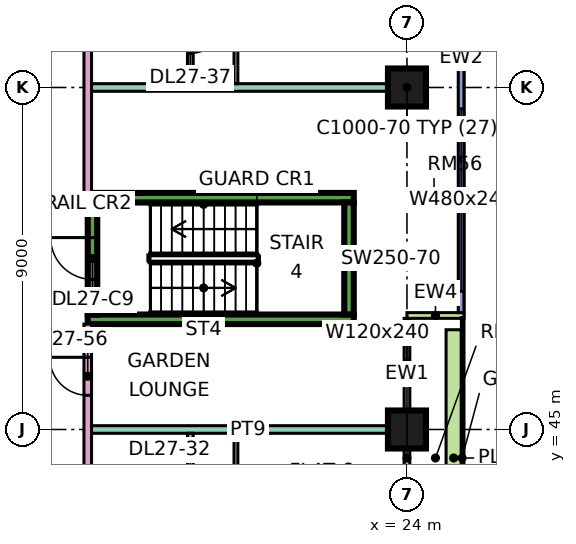
"""IFC4 building model, lengths in metres.
Left out: names, types, materials, properties, quantities, classifications, styles, units other than length and angle.
Written with IfcOpenShell. Run it as: python <this file> out.ifc"""

import sys

from ifc_helpers import new_model, si_unit, direction, frame, frame_2d, origin, origin_2d, place, context, subcontext, project, spatial, rectangle, extrude, element, fill, save


model = new_model("IFC4")
c1 = context("Model", 3, precision=1e-05, world=origin(), true_north=direction((0.0, 1.0)))
c2 = subcontext(c1, "Body", "Model", "MODEL_VIEW")
j1 = project(units=[si_unit("LENGTHUNIT", "METRE"), si_unit("PLANEANGLEUNIT", "RADIAN")], contexts=[c1])
p1 = place(None, origin())
s1 = spatial("IfcSite", under=j1, at=p1, CompositionType="ELEMENT")
p2 = place(p1, origin())
s2 = spatial("IfcBuilding", under=s1, at=p2, CompositionType="ELEMENT")
p3 = place(p2, frame((0.0, 0.0, 118.15)))
s3 = spatial("IfcBuildingStorey", under=s2, at=p3, CompositionType="ELEMENT", Elevation=118.15)
for number, where, z_axis, x_axis in (
    (1, (24.0, 45.0, 0.0), (0.0, 0.0, 1.0), (1.0, 0.0, 0.0)),
    (2, (24.0, 54.0, 0.0), (0.0, 0.0, 1.0), (1.0, 0.0, 0.0)),
):
    element("IfcColumn", number, at=place(p3, frame(where, z_axis=z_axis, x_axis=x_axis)), inside=s3, PredefinedType="COLUMN", context=c2, shape_type="SweptSolid", body=[
        extrude(rectangle(XDim=1.0, YDim=1.0, at=origin_2d()), origin(), (0.0, 0.0, 1.0), 3.75),
    ])
for number, where, z_axis, x_axis in (
    (3, (15.6, 47.9, 0.0), (0.0, 0.0, 1.0), (1.0, 0.0, 0.0)),
    (4, (15.6, 51.1, 0.0), (0.0, 0.0, 1.0), (1.0, 0.0, 0.0)),
):
    element("IfcWall", number, at=place(p3, frame(where, z_axis=z_axis, x_axis=x_axis)), inside=s3, PredefinedType="SHEAR", context=c2, shape_type="SweptSolid", body=[
        extrude(rectangle(XDim=7.0, YDim=0.25, at=frame_2d((3.5, 0.0))), origin(), (0.0, 0.0, 1.0), 3.75),
    ])
p4 = place(p3, frame((15.725, 48.025, 0.0), z_axis=(0.0, 0.0, 1.0), x_axis=(0.0, 1.0, 0.0)))
e5 = element("IfcWall", 5, at=p4, inside=s3, PredefinedType="SHEAR", context=c2, shape_type="SweptSolid", body=[
    extrude(rectangle(XDim=2.95, YDim=0.25, at=frame_2d((1.475, 0.0))), origin(), (0.0, 0.0, 1.0), 3.75),
])
p5 = place(p4, frame((0.925, 0.0, 0.0)))
e6 = element("IfcOpeningElement", 6, at=p5, cuts=e5, PredefinedType="OPENING", context=c2, shape_type="SweptSolid", body=[
    extrude(rectangle(XDim=1.1, YDim=2.2, at=frame_2d((0.55, 1.1))), frame((0.0, 0.135, 0.0), z_axis=(0.0, -1.0, 0.0), x_axis=(1.0, 0.0, 0.0)), (0.0, 0.0, 1.0), 0.27),
])
p6 = place(p3, frame((22.475, 48.025, 0.0), z_axis=(0.0, 0.0, 1.0), x_axis=(0.0, 1.0, 0.0)))
e7 = element("IfcWall", 7, at=p6, inside=s3, PredefinedType="SHEAR", context=c2, shape_type="SweptSolid", body=[
    extrude(rectangle(XDim=2.95, YDim=0.25, at=frame_2d((1.475, 0.0))), origin(), (0.0, 0.0, 1.0), 3.75),
])
p7 = place(p3, frame((24.0, 40.575, 0.0), z_axis=(0.0, 0.0, 1.0), x_axis=(0.0, 1.0, 0.0)))
e8 = element("IfcWall", 8, at=p7, inside=s3, PredefinedType="SOLIDWALL", context=c2, shape_type="SweptSolid", body=[
    extrude(rectangle(XDim=7.35, YDim=0.15, at=frame_2d((3.675, 0.0))), origin(), (0.0, 0.0, 1.0), 3.35),
])
p8 = place(p7, frame((0.262, 0.0, 0.45)))
e9 = element("IfcOpeningElement", 9, at=p8, cuts=e8, PredefinedType="OPENING", context=c2, shape_type="SweptSolid", body=[
    extrude(rectangle(XDim=0.9, YDim=2.4, at=frame_2d((0.45, 1.2))), frame((0.0, 0.085, 0.0), z_axis=(0.0, -1.0, 0.0), x_axis=(1.0, 0.0, 0.0)), (0.0, 0.0, 1.0), 0.17),
])
p9 = place(p7, frame((2.025, 0.0, 0.0)))
e10 = element("IfcOpeningElement", 10, at=p9, cuts=e8, PredefinedType="OPENING", context=c2, shape_type="SweptSolid", body=[
    extrude(rectangle(XDim=1.2, YDim=2.4, at=frame_2d((0.6, 1.2))), frame((0.0, 0.085, 0.0), z_axis=(0.0, -1.0, 0.0), x_axis=(1.0, 0.0, 0.0)), (0.0, 0.0, 1.0), 0.17),
])
p10 = place(p7, frame((5.587, 0.0, 0.45)))
e11 = element("IfcOpeningElement", 11, at=p10, cuts=e8, PredefinedType="OPENING", context=c2, shape_type="SweptSolid", body=[
    extrude(rectangle(XDim=1.2, YDim=2.4, at=frame_2d((0.6, 1.2))), frame((0.0, 0.085, 0.0), z_axis=(0.0, -1.0, 0.0), x_axis=(1.0, 0.0, 0.0)), (0.0, 0.0, 1.0), 0.17),
])
p11 = place(p3, frame((25.5, 48.0, 0.0), z_axis=(0.0, 0.0, 1.0), x_axis=(-1.0, 0.0, 0.0)))
e12 = element("IfcWall", 12, at=p11, inside=s3, PredefinedType="SOLIDWALL", context=c2, shape_type="SweptSolid", body=[
    extrude(rectangle(XDim=1.5, YDim=0.15, at=frame_2d((0.75, 0.0))), origin(), (0.0, 0.0, 1.0), 3.35),
])
p12 = place(p3, frame((25.425, 48.075, 0.0), z_axis=(0.0, 0.0, 1.0), x_axis=(0.0, 1.0, 0.0)))
e13 = element("IfcWall", 13, at=p12, inside=s3, PredefinedType="SOLIDWALL", context=c2, shape_type="SweptSolid", body=[
    extrude(rectangle(XDim=13.425, YDim=0.15, at=frame_2d((6.712, 0.0))), origin(), (0.0, 0.0, 1.0), 3.35),
])
p13 = place(p12, frame((0.562, 0.0, 0.45)))
e14 = element("IfcOpeningElement", 14, at=p13, cuts=e13, PredefinedType="OPENING", context=c2, shape_type="SweptSolid", body=[
    extrude(rectangle(XDim=4.8, YDim=2.4, at=frame_2d((2.4, 1.2))), frame((0.0, 0.085, 0.0), z_axis=(0.0, -1.0, 0.0), x_axis=(1.0, 0.0, 0.0)), (0.0, 0.0, 1.0), 0.17),
])
p14 = place(p12, frame((6.525, 0.0, 0.45)))
e15 = element("IfcOpeningElement", 15, at=p14, cuts=e13, PredefinedType="OPENING", context=c2, shape_type="SweptSolid", body=[
    extrude(rectangle(XDim=1.8, YDim=2.4, at=frame_2d((0.9, 1.2))), frame((0.0, 0.085, 0.0), z_axis=(0.0, -1.0, 0.0), x_axis=(1.0, 0.0, 0.0)), (0.0, 0.0, 1.0), 0.17),
])
p15 = place(p12, frame((9.525, 0.0, 0.45)))
e16 = element("IfcOpeningElement", 16, at=p15, cuts=e13, PredefinedType="OPENING", context=c2, shape_type="SweptSolid", body=[
    extrude(rectangle(XDim=1.8, YDim=2.4, at=frame_2d((0.9, 1.2))), frame((0.0, 0.085, 0.0), z_axis=(0.0, -1.0, 0.0), x_axis=(1.0, 0.0, 0.0)), (0.0, 0.0, 1.0), 0.17),
])
p16 = place(p12, frame((12.225, 0.0, 0.45)))
e17 = element("IfcOpeningElement", 17, at=p16, cuts=e13, PredefinedType="OPENING", context=c2, shape_type="SweptSolid", body=[
    extrude(rectangle(XDim=0.9, YDim=2.4, at=frame_2d((0.45, 1.2))), frame((0.0, 0.085, 0.0), z_axis=(0.0, -1.0, 0.0), x_axis=(1.0, 0.0, 0.0)), (0.0, 0.0, 1.0), 0.17),
])
p17 = place(p3, frame((25.229, 40.875, 0.0), z_axis=(0.0, 0.0, 1.0), x_axis=(0.0, 1.0, 0.0)))
e18 = element("IfcWall", 18, at=p17, inside=s3, PredefinedType="SOLIDWALL", context=c2, shape_type="SweptSolid", body=[
    extrude(rectangle(XDim=6.75, YDim=0.4, at=frame_2d((3.375, 0.0))), origin(), (0.0, 0.0, 1.0), 0.7),
])
p18 = place(p3, frame((15.6, 20.0, 0.0), z_axis=(0.0, 0.0, 1.0), x_axis=(0.0, 1.0, 0.0)))
e19 = element("IfcWall", 19, at=p18, inside=s3, PredefinedType="PARTITIONING", context=c2, shape_type="SweptSolid", body=[
    extrude(rectangle(XDim=27.775, YDim=0.2, at=frame_2d((13.887, 0.0))), origin(), (0.0, 0.0, 1.0), 3.35),
])
p19 = place(p18, frame((7.15, 0.0, 0.0)))
e20 = element("IfcOpeningElement", 20, at=p19, cuts=e19, PredefinedType="OPENING", context=c2, shape_type="SweptSolid", body=[
    extrude(rectangle(XDim=1.6, YDim=2.1, at=frame_2d((0.8, 1.05))), frame((0.0, 0.11, 0.0), z_axis=(0.0, -1.0, 0.0), x_axis=(1.0, 0.0, 0.0)), (0.0, 0.0, 1.0), 0.22),
])
p20 = place(p18, frame((13.5, 0.0, 0.0)))
e21 = element("IfcOpeningElement", 21, at=p20, cuts=e19, PredefinedType="OPENING", context=c2, shape_type="SweptSolid", body=[
    extrude(rectangle(XDim=1.0, YDim=2.1, at=frame_2d((0.5, 1.05))), frame((0.0, 0.11, 0.0), z_axis=(0.0, -1.0, 0.0), x_axis=(1.0, 0.0, 0.0)), (0.0, 0.0, 1.0), 0.22),
])
p21 = place(p18, frame((17.2, 0.0, 0.0)))
e22 = element("IfcOpeningElement", 22, at=p21, cuts=e19, PredefinedType="OPENING", context=c2, shape_type="SweptSolid", body=[
    extrude(rectangle(XDim=1.0, YDim=2.1, at=frame_2d((0.5, 1.05))), frame((0.0, 0.11, 0.0), z_axis=(0.0, -1.0, 0.0), x_axis=(1.0, 0.0, 0.0)), (0.0, 0.0, 1.0), 0.22),
])
p22 = place(p18, frame((1.15, 0.0, 0.0)))
e23 = element("IfcOpeningElement", 23, at=p22, cuts=e19, PredefinedType="OPENING", context=c2, shape_type="SweptSolid", body=[
    extrude(rectangle(XDim=1.8, YDim=2.1, at=frame_2d((0.9, 1.05))), frame((0.0, 0.11, 0.0), z_axis=(0.0, -1.0, 0.0), x_axis=(1.0, 0.0, 0.0)), (0.0, 0.0, 1.0), 0.22),
])
p23 = place(p18, frame((25.9, 0.0, 0.0)))
e24 = element("IfcOpeningElement", 24, at=p23, cuts=e19, PredefinedType="OPENING", context=c2, shape_type="SweptSolid", body=[
    extrude(rectangle(XDim=1.0, YDim=2.1, at=frame_2d((0.5, 1.05))), frame((0.0, 0.11, 0.0), z_axis=(0.0, -1.0, 0.0), x_axis=(1.0, 0.0, 0.0)), (0.0, 0.0, 1.0), 0.22),
])
p24 = place(p3, frame((15.6, 51.225, 0.0), z_axis=(0.0, 0.0, 1.0), x_axis=(0.0, 1.0, 0.0)))
e25 = element("IfcWall", 25, at=p24, inside=s3, PredefinedType="PARTITIONING", context=c2, shape_type="SweptSolid", body=[
    extrude(rectangle(XDim=11.701, YDim=0.2, at=frame_2d((5.851, 0.0))), origin(), (0.0, 0.0, 1.0), 3.35),
])
p25 = place(p24, frame((9.975, 0.0, 0.0)))
e26 = element("IfcOpeningElement", 26, at=p25, cuts=e25, PredefinedType="OPENING", context=c2, shape_type="SweptSolid", body=[
    extrude(rectangle(XDim=1.0, YDim=2.1, at=frame_2d((0.5, 1.05))), frame((0.0, 0.11, 0.0), z_axis=(0.0, -1.0, 0.0), x_axis=(1.0, 0.0, 0.0)), (0.0, 0.0, 1.0), 0.22),
])
p26 = place(p3, frame((15.7, 45.0, 0.0), z_axis=(0.0, 0.0, 1.0), x_axis=(1.0, 0.0, 0.0)))
e27 = element("IfcWall", 27, at=p26, inside=s3, PredefinedType="PARTITIONING", context=c2, shape_type="SweptSolid", body=[
    extrude(rectangle(XDim=8.226, YDim=0.2, at=frame_2d((4.113, 0.0))), origin(), (0.0, 0.0, 1.0), 3.35),
])
p27 = place(p3, frame((15.7, 54.0, 0.0), z_axis=(0.0, 0.0, 1.0), x_axis=(1.0, 0.0, 0.0)))
e28 = element("IfcWall", 28, at=p27, inside=s3, PredefinedType="PARTITIONING", context=c2, shape_type="SweptSolid", body=[
    extrude(rectangle(XDim=8.3, YDim=0.2, at=frame_2d((4.15, 0.0))), origin(), (0.0, 0.0, 1.0), 3.35),
])
p28 = place(p3, frame((18.3, 39.225, 0.0), z_axis=(0.0, 0.0, 1.0), x_axis=(0.0, 1.0, 0.0)))
e29 = element("IfcWall", 29, at=p28, inside=s3, PredefinedType="PARTITIONING", context=c2, shape_type="SweptSolid", body=[
    extrude(rectangle(XDim=5.675, YDim=0.15, at=frame_2d((2.837, 0.0))), origin(), (0.0, 0.0, 1.0), 3.35),
])
p29 = place(p28, frame((3.825, 0.0, 0.0)))
e30 = element("IfcOpeningElement", 30, at=p29, cuts=e29, PredefinedType="OPENING", context=c2, shape_type="SweptSolid", body=[
    extrude(rectangle(XDim=0.9, YDim=2.1, at=frame_2d((0.45, 1.05))), frame((0.0, 0.085, 0.0), z_axis=(0.0, -1.0, 0.0), x_axis=(1.0, 0.0, 0.0)), (0.0, 0.0, 1.0), 0.17),
])
p30 = place(p3, frame((18.3, 54.1, 0.0), z_axis=(0.0, 0.0, 1.0), x_axis=(0.0, 1.0, 0.0)))
e31 = element("IfcWall", 31, at=p30, inside=s3, PredefinedType="PARTITIONING", context=c2, shape_type="SweptSolid", body=[
    extrude(rectangle(XDim=6.275, YDim=0.15, at=frame_2d((3.137, 0.0))), origin(), (0.0, 0.0, 1.0), 3.35),
])
p31 = place(p30, frame((4.05, 0.0, 0.0)))
e32 = element("IfcOpeningElement", 32, at=p31, cuts=e31, PredefinedType="OPENING", context=c2, shape_type="SweptSolid", body=[
    extrude(rectangle(XDim=0.8, YDim=2.1, at=frame_2d((0.4, 1.05))), frame((0.0, 0.085, 0.0), z_axis=(0.0, -1.0, 0.0), x_axis=(1.0, 0.0, 0.0)), (0.0, 0.0, 1.0), 0.17),
])
p32 = place(p30, frame((0.8, 0.0, 0.0)))
e33 = element("IfcOpeningElement", 33, at=p32, cuts=e31, PredefinedType="OPENING", context=c2, shape_type="SweptSolid", body=[
    extrude(rectangle(XDim=0.9, YDim=2.1, at=frame_2d((0.45, 1.05))), frame((0.0, 0.085, 0.0), z_axis=(0.0, -1.0, 0.0), x_axis=(1.0, 0.0, 0.0)), (0.0, 0.0, 1.0), 0.17),
])
p33 = place(p3, frame((19.5, 38.95, 0.0), z_axis=(0.0, 0.0, 1.0), x_axis=(0.0, 1.0, 0.0)))
e34 = element("IfcWall", 34, at=p33, inside=s3, PredefinedType="PARTITIONING", context=c2, shape_type="SweptSolid", body=[
    extrude(rectangle(XDim=5.95, YDim=0.1, at=frame_2d((2.975, 0.0))), origin(), (0.0, 0.0, 1.0), 3.35),
])
p34 = place(p33, frame((1.1, 0.0, 0.0)))
e35 = element("IfcOpeningElement", 35, at=p34, cuts=e34, PredefinedType="OPENING", context=c2, shape_type="SweptSolid", body=[
    extrude(rectangle(XDim=0.9, YDim=2.1, at=frame_2d((0.45, 1.05))), frame((0.0, 0.06, 0.0), z_axis=(0.0, -1.0, 0.0), x_axis=(1.0, 0.0, 0.0)), (0.0, 0.0, 1.0), 0.12),
])
p35 = place(p33, frame((4.1, 0.0, 0.0)))
e36 = element("IfcOpeningElement", 36, at=p35, cuts=e34, PredefinedType="OPENING", context=c2, shape_type="SweptSolid", body=[
    extrude(rectangle(XDim=0.9, YDim=2.1, at=frame_2d((0.45, 1.05))), frame((0.0, 0.06, 0.0), z_axis=(0.0, -1.0, 0.0), x_axis=(1.0, 0.0, 0.0)), (0.0, 0.0, 1.0), 0.12),
])
p36 = place(p3, frame((19.5, 54.1, 0.0), z_axis=(0.0, 0.0, 1.0), x_axis=(0.0, 1.0, 0.0)))
e37 = element("IfcWall", 37, at=p36, inside=s3, PredefinedType="PARTITIONING", context=c2, shape_type="SweptSolid", body=[
    extrude(rectangle(XDim=2.85, YDim=0.1, at=frame_2d((1.425, 0.0))), origin(), (0.0, 0.0, 1.0), 3.35),
])
p37 = place(p36, frame((0.95, 0.0, 0.0)))
e38 = element("IfcOpeningElement", 38, at=p37, cuts=e37, PredefinedType="OPENING", context=c2, shape_type="SweptSolid", body=[
    extrude(rectangle(XDim=0.9, YDim=2.1, at=frame_2d((0.45, 1.05))), frame((0.0, 0.06, 0.0), z_axis=(0.0, -1.0, 0.0), x_axis=(1.0, 0.0, 0.0)), (0.0, 0.0, 1.0), 0.12),
])
p38 = place(p10, origin())
e39 = element("IfcWindow", 39, at=p38, inside=s3, PartitioningType="SINGLE_PANEL", PredefinedType="WINDOW", context=c2, shape_type="SweptSolid", body=[
    extrude(rectangle(XDim=1.2, YDim=2.4, at=frame_2d((0.6, 1.2))), frame((0.0, 0.03, 0.0), z_axis=(0.0, -1.0, 0.0), x_axis=(1.0, 0.0, 0.0)), (0.0, 0.0, 1.0), 0.06),
])
fill(e11, e39)
p39 = place(p13, origin())
e40 = element("IfcWindow", 40, at=p39, inside=s3, PartitioningType="SINGLE_PANEL", PredefinedType="WINDOW", context=c2, shape_type="SweptSolid", body=[
    extrude(rectangle(XDim=4.8, YDim=2.4, at=frame_2d((2.4, 1.2))), frame((0.0, 0.03, 0.0), z_axis=(0.0, -1.0, 0.0), x_axis=(1.0, 0.0, 0.0)), (0.0, 0.0, 1.0), 0.06),
])
fill(e14, e40)
p40 = place(p14, origin())
e41 = element("IfcWindow", 41, at=p40, inside=s3, PartitioningType="SINGLE_PANEL", PredefinedType="WINDOW", context=c2, shape_type="SweptSolid", body=[
    extrude(rectangle(XDim=1.8, YDim=2.4, at=frame_2d((0.9, 1.2))), frame((0.0, 0.03, 0.0), z_axis=(0.0, -1.0, 0.0), x_axis=(1.0, 0.0, 0.0)), (0.0, 0.0, 1.0), 0.06),
])
fill(e15, e41)
p41 = place(p5, frame((1.1, 0.0, 0.0), z_axis=(0.0, 0.0, 1.0), x_axis=(-1.0, 0.0, 0.0)))
e42 = element("IfcDoor", 42, at=p41, inside=s3, OperationType="SINGLE_SWING_RIGHT", PredefinedType="DOOR", context=c2, shape_type="SweptSolid", body=[
    extrude(rectangle(XDim=1.1, YDim=2.2, at=frame_2d((0.55, 1.1))), frame((0.0, 0.025, 0.0), z_axis=(0.0, -1.0, 0.0), x_axis=(1.0, 0.0, 0.0)), (0.0, 0.0, 1.0), 0.05),
])
fill(e6, e42)
p42 = place(p32, origin())
e43 = element("IfcDoor", 43, at=p42, inside=s3, OperationType="SINGLE_SWING_RIGHT", PredefinedType="DOOR", context=c2, shape_type="SweptSolid", body=[
    extrude(rectangle(XDim=0.9, YDim=2.1, at=frame_2d((0.45, 1.05))), frame((0.0, 0.025, 0.0), z_axis=(0.0, -1.0, 0.0), x_axis=(1.0, 0.0, 0.0)), (0.0, 0.0, 1.0), 0.05),
])
fill(e33, e43)
p43 = place(p23, frame((1.0, 0.0, 0.0), z_axis=(0.0, 0.0, 1.0), x_axis=(-1.0, 0.0, 0.0)))
e44 = element("IfcDoor", 44, at=p43, inside=s3, OperationType="SINGLE_SWING_RIGHT", PredefinedType="DOOR", context=c2, shape_type="SweptSolid", body=[
    extrude(rectangle(XDim=1.0, YDim=2.1, at=frame_2d((0.5, 1.05))), frame((0.0, 0.025, 0.0), z_axis=(0.0, -1.0, 0.0), x_axis=(1.0, 0.0, 0.0)), (0.0, 0.0, 1.0), 0.05),
])
fill(e24, e44)
save(model, sys.argv[1])
